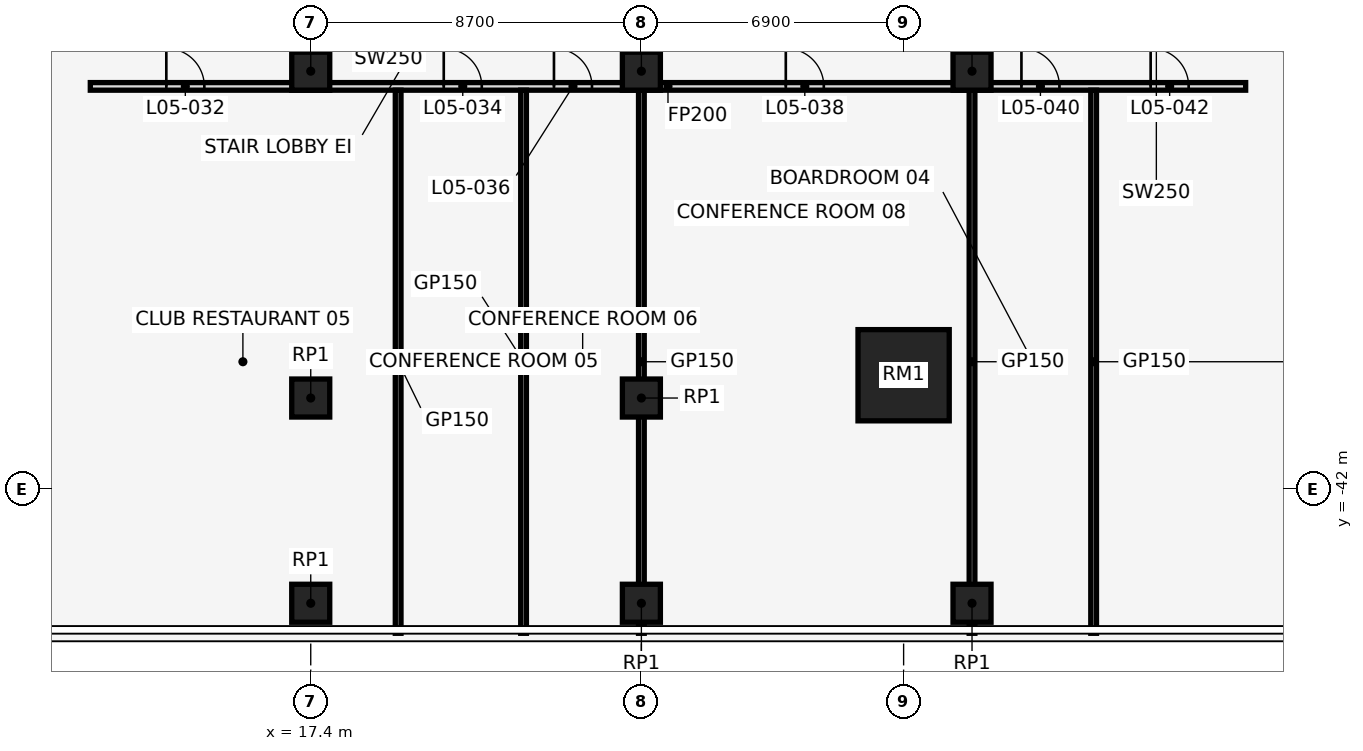
"""IFC4 building model, lengths in metres.
Left out: names, types, materials, properties, quantities, classifications, styles, units other than length and angle.
Written with IfcOpenShell. Run it as: python <this file> out.ifc"""

import sys

from ifc_helpers import new_model, si_unit, direction, frame, frame_2d, origin, origin_2d, place, context, subcontext, project, spatial, rectangle, extrude, element, fill, save


model = new_model("IFC4")
c1 = context("Model", 3, precision=1e-05, world=origin(), true_north=direction((0.0, 1.0)))
c2 = subcontext(c1, "Body", "Model", "MODEL_VIEW")
j1 = project(units=[si_unit("LENGTHUNIT", "METRE"), si_unit("PLANEANGLEUNIT", "RADIAN")], contexts=[c1])
p1 = place(None, origin())
s1 = spatial("IfcSite", under=j1, at=p1, CompositionType="ELEMENT")
p2 = place(p1, origin())
s2 = spatial("IfcBuilding", under=s1, at=p2, CompositionType="ELEMENT")
p3 = place(p2, frame((0.0, 0.0, 30.0)))
s3 = spatial("IfcBuildingStorey", under=s2, at=p3, CompositionType="ELEMENT", Elevation=30.0)
for number, where, z_axis, x_axis in (
    (1, (17.4, -39.6, 0.0), (0.0, 0.0, 1.0), (1.0, 0.0, 0.0)),
    (2, (26.1, -39.6, 0.0), (0.0, 0.0, 1.0), (1.0, 0.0, 0.0)),
):
    element("IfcColumn", number, at=place(p3, frame(where, z_axis=z_axis, x_axis=x_axis)), inside=s3, PredefinedType="COLUMN", context=c2, shape_type="SweptSolid", body=[
        extrude(rectangle(XDim=1.0, YDim=1.0, at=origin_2d()), origin(), (0.0, 0.0, 1.0), 5.0),
    ])
p4 = place(p3, frame((33.0, -39.0, 0.0), z_axis=(0.0, 0.0, 1.0), x_axis=(1.0, 0.0, 0.0)))
e3 = element("IfcColumn", 3, at=p4, inside=s3, PredefinedType="COLUMN", context=c2, shape_type="SweptSolid", body=[
    extrude(rectangle(XDim=2.4, YDim=2.4, at=origin_2d()), origin(), (0.0, 0.0, 1.0), 5.0),
])
for number, where, z_axis, x_axis in (
    (4, (17.4, -31.0, 0.0), (0.0, 0.0, 1.0), (1.0, 0.0, 0.0)),
    (5, (17.4, -45.0, 0.0), (0.0, 0.0, 1.0), (1.0, 0.0, 0.0)),
    (6, (26.1, -31.0, 0.0), (0.0, 0.0, 1.0), (1.0, 0.0, 0.0)),
    (7, (26.1, -45.0, 0.0), (0.0, 0.0, 1.0), (1.0, 0.0, 0.0)),
    (8, (34.8, -31.0, 0.0), (0.0, 0.0, 1.0), (1.0, 0.0, 0.0)),
    (9, (34.8, -45.0, 0.0), (0.0, 0.0, 1.0), (1.0, 0.0, 0.0)),
):
    element("IfcColumn", number, at=place(p3, frame(where, z_axis=z_axis, x_axis=x_axis)), inside=s3, PredefinedType="COLUMN", context=c2, shape_type="SweptSolid", body=[
        extrude(rectangle(XDim=1.0, YDim=1.0, at=origin_2d()), origin(), (0.0, 0.0, 1.0), 5.0),
    ])
p5 = place(p3, frame((11.6, -31.4, 0.0), z_axis=(0.0, 0.0, 1.0), x_axis=(1.0, 0.0, 0.0)))
e10 = element("IfcWall", 10, at=p5, inside=s3, PredefinedType="PARTITIONING", context=c2, shape_type="SweptSolid", body=[
    extrude(rectangle(XDim=30.4, YDim=0.2, at=frame_2d((15.2, 0.0))), origin(), (0.0, 0.0, 1.0), 3.74),
])
p6 = place(p5, frame((2.0, 0.0, 0.0)))
e11 = element("IfcOpeningElement", 11, at=p6, cuts=e10, PredefinedType="OPENING", context=c2, shape_type="SweptSolid", body=[
    extrude(rectangle(XDim=1.0, YDim=2.1, at=frame_2d((0.5, 1.05))), frame((0.0, 0.112, 0.0), z_axis=(0.0, -1.0, 0.0), x_axis=(1.0, 0.0, 0.0)), (0.0, 0.0, 1.0), 0.224),
])
p7 = place(p5, frame((9.3, 0.0, 0.0)))
e12 = element("IfcOpeningElement", 12, at=p7, cuts=e10, PredefinedType="OPENING", context=c2, shape_type="SweptSolid", body=[
    extrude(rectangle(XDim=1.0, YDim=2.1, at=frame_2d((0.5, 1.05))), frame((0.0, 0.112, 0.0), z_axis=(0.0, -1.0, 0.0), x_axis=(1.0, 0.0, 0.0)), (0.0, 0.0, 1.0), 0.224),
])
p8 = place(p5, frame((12.2, 0.0, 0.0)))
e13 = element("IfcOpeningElement", 13, at=p8, cuts=e10, PredefinedType="OPENING", context=c2, shape_type="SweptSolid", body=[
    extrude(rectangle(XDim=1.0, YDim=2.1, at=frame_2d((0.5, 1.05))), frame((0.0, 0.112, 0.0), z_axis=(0.0, -1.0, 0.0), x_axis=(1.0, 0.0, 0.0)), (0.0, 0.0, 1.0), 0.224),
])
p9 = place(p5, frame((18.3, 0.0, 0.0)))
e14 = element("IfcOpeningElement", 14, at=p9, cuts=e10, PredefinedType="OPENING", context=c2, shape_type="SweptSolid", body=[
    extrude(rectangle(XDim=1.0, YDim=2.1, at=frame_2d((0.5, 1.05))), frame((0.0, 0.112, 0.0), z_axis=(0.0, -1.0, 0.0), x_axis=(1.0, 0.0, 0.0)), (0.0, 0.0, 1.0), 0.224),
])
p10 = place(p5, frame((24.5, 0.0, 0.0)))
e15 = element("IfcOpeningElement", 15, at=p10, cuts=e10, PredefinedType="OPENING", context=c2, shape_type="SweptSolid", body=[
    extrude(rectangle(XDim=1.0, YDim=2.1, at=frame_2d((0.5, 1.05))), frame((0.0, 0.112, 0.0), z_axis=(0.0, -1.0, 0.0), x_axis=(1.0, 0.0, 0.0)), (0.0, 0.0, 1.0), 0.224),
])
p11 = place(p5, frame((27.9, 0.0, 0.0)))
e16 = element("IfcOpeningElement", 16, at=p11, cuts=e10, PredefinedType="OPENING", context=c2, shape_type="SweptSolid", body=[
    extrude(rectangle(XDim=1.0, YDim=2.1, at=frame_2d((0.5, 1.05))), frame((0.0, 0.112, 0.0), z_axis=(0.0, -1.0, 0.0), x_axis=(1.0, 0.0, 0.0)), (0.0, 0.0, 1.0), 0.224),
])
for number, where, z_axis, x_axis in (
    (17, (19.7, -45.79, 0.0), (0.0, 0.0, 1.0), (0.0, 1.0, 0.0)),
    (18, (23.0, -45.79, 0.0), (0.0, 0.0, 1.0), (0.0, 1.0, 0.0)),
    (19, (26.1, -45.79, 0.0), (0.0, 0.0, 1.0), (0.0, 1.0, 0.0)),
    (20, (34.8, -45.79, 0.0), (0.0, 0.0, 1.0), (0.0, 1.0, 0.0)),
    (21, (38.0, -45.79, 0.0), (0.0, 0.0, 1.0), (0.0, 1.0, 0.0)),
):
    element("IfcWall", number, at=place(p3, frame(where, z_axis=z_axis, x_axis=x_axis)), inside=s3, PredefinedType="PARTITIONING", context=c2, shape_type="SweptSolid", body=[
        extrude(rectangle(XDim=14.29, YDim=0.15, at=frame_2d((7.145, 0.0))), origin(), (0.0, 0.0, 1.0), 3.74),
    ])
p12 = place(p6, frame((1.0, 0.0, 0.0), z_axis=(0.0, 0.0, 1.0), x_axis=(-1.0, 0.0, 0.0)))
e22 = element("IfcDoor", 22, at=p12, inside=s3, OperationType="SINGLE_SWING_RIGHT", PredefinedType="DOOR", context=c2, shape_type="SweptSolid", body=[
    extrude(rectangle(XDim=1.0, YDim=2.1, at=frame_2d((0.5, 1.05))), frame((0.0, 0.025, 0.0), z_axis=(0.0, -1.0, 0.0), x_axis=(1.0, 0.0, 0.0)), (0.0, 0.0, 1.0), 0.05),
])
fill(e11, e22)
p13 = place(p7, frame((1.0, 0.0, 0.0), z_axis=(0.0, 0.0, 1.0), x_axis=(-1.0, 0.0, 0.0)))
e23 = element("IfcDoor", 23, at=p13, inside=s3, OperationType="SINGLE_SWING_LEFT", PredefinedType="DOOR", context=c2, shape_type="SweptSolid", body=[
    extrude(rectangle(XDim=1.0, YDim=2.1, at=frame_2d((0.5, 1.05))), frame((0.0, 0.025, 0.0), z_axis=(0.0, -1.0, 0.0), x_axis=(1.0, 0.0, 0.0)), (0.0, 0.0, 1.0), 0.05),
])
fill(e12, e23)
p14 = place(p8, frame((1.0, 0.0, 0.0), z_axis=(0.0, 0.0, 1.0), x_axis=(-1.0, 0.0, 0.0)))
e24 = element("IfcDoor", 24, at=p14, inside=s3, OperationType="SINGLE_SWING_RIGHT", PredefinedType="DOOR", context=c2, shape_type="SweptSolid", body=[
    extrude(rectangle(XDim=1.0, YDim=2.1, at=frame_2d((0.5, 1.05))), frame((0.0, 0.025, 0.0), z_axis=(0.0, -1.0, 0.0), x_axis=(1.0, 0.0, 0.0)), (0.0, 0.0, 1.0), 0.05),
])
fill(e13, e24)
p15 = place(p9, frame((1.0, 0.0, 0.0), z_axis=(0.0, 0.0, 1.0), x_axis=(-1.0, 0.0, 0.0)))
e25 = element("IfcDoor", 25, at=p15, inside=s3, OperationType="SINGLE_SWING_RIGHT", PredefinedType="DOOR", context=c2, shape_type="SweptSolid", body=[
    extrude(rectangle(XDim=1.0, YDim=2.1, at=frame_2d((0.5, 1.05))), frame((0.0, 0.025, 0.0), z_axis=(0.0, -1.0, 0.0), x_axis=(1.0, 0.0, 0.0)), (0.0, 0.0, 1.0), 0.05),
])
fill(e14, e25)
p16 = place(p10, frame((1.0, 0.0, 0.0), z_axis=(0.0, 0.0, 1.0), x_axis=(-1.0, 0.0, 0.0)))
e26 = element("IfcDoor", 26, at=p16, inside=s3, OperationType="SINGLE_SWING_LEFT", PredefinedType="DOOR", context=c2, shape_type="SweptSolid", body=[
    extrude(rectangle(XDim=1.0, YDim=2.1, at=frame_2d((0.5, 1.05))), frame((0.0, 0.025, 0.0), z_axis=(0.0, -1.0, 0.0), x_axis=(1.0, 0.0, 0.0)), (0.0, 0.0, 1.0), 0.05),
])
fill(e15, e26)
p17 = place(p11, frame((1.0, 0.0, 0.0), z_axis=(0.0, 0.0, 1.0), x_axis=(-1.0, 0.0, 0.0)))
e27 = element("IfcDoor", 27, at=p17, inside=s3, OperationType="SINGLE_SWING_RIGHT", PredefinedType="DOOR", context=c2, shape_type="SweptSolid", body=[
    extrude(rectangle(XDim=1.0, YDim=2.1, at=frame_2d((0.5, 1.05))), frame((0.0, 0.025, 0.0), z_axis=(0.0, -1.0, 0.0), x_axis=(1.0, 0.0, 0.0)), (0.0, 0.0, 1.0), 0.05),
])
fill(e16, e27)
save(model, sys.argv[1])
